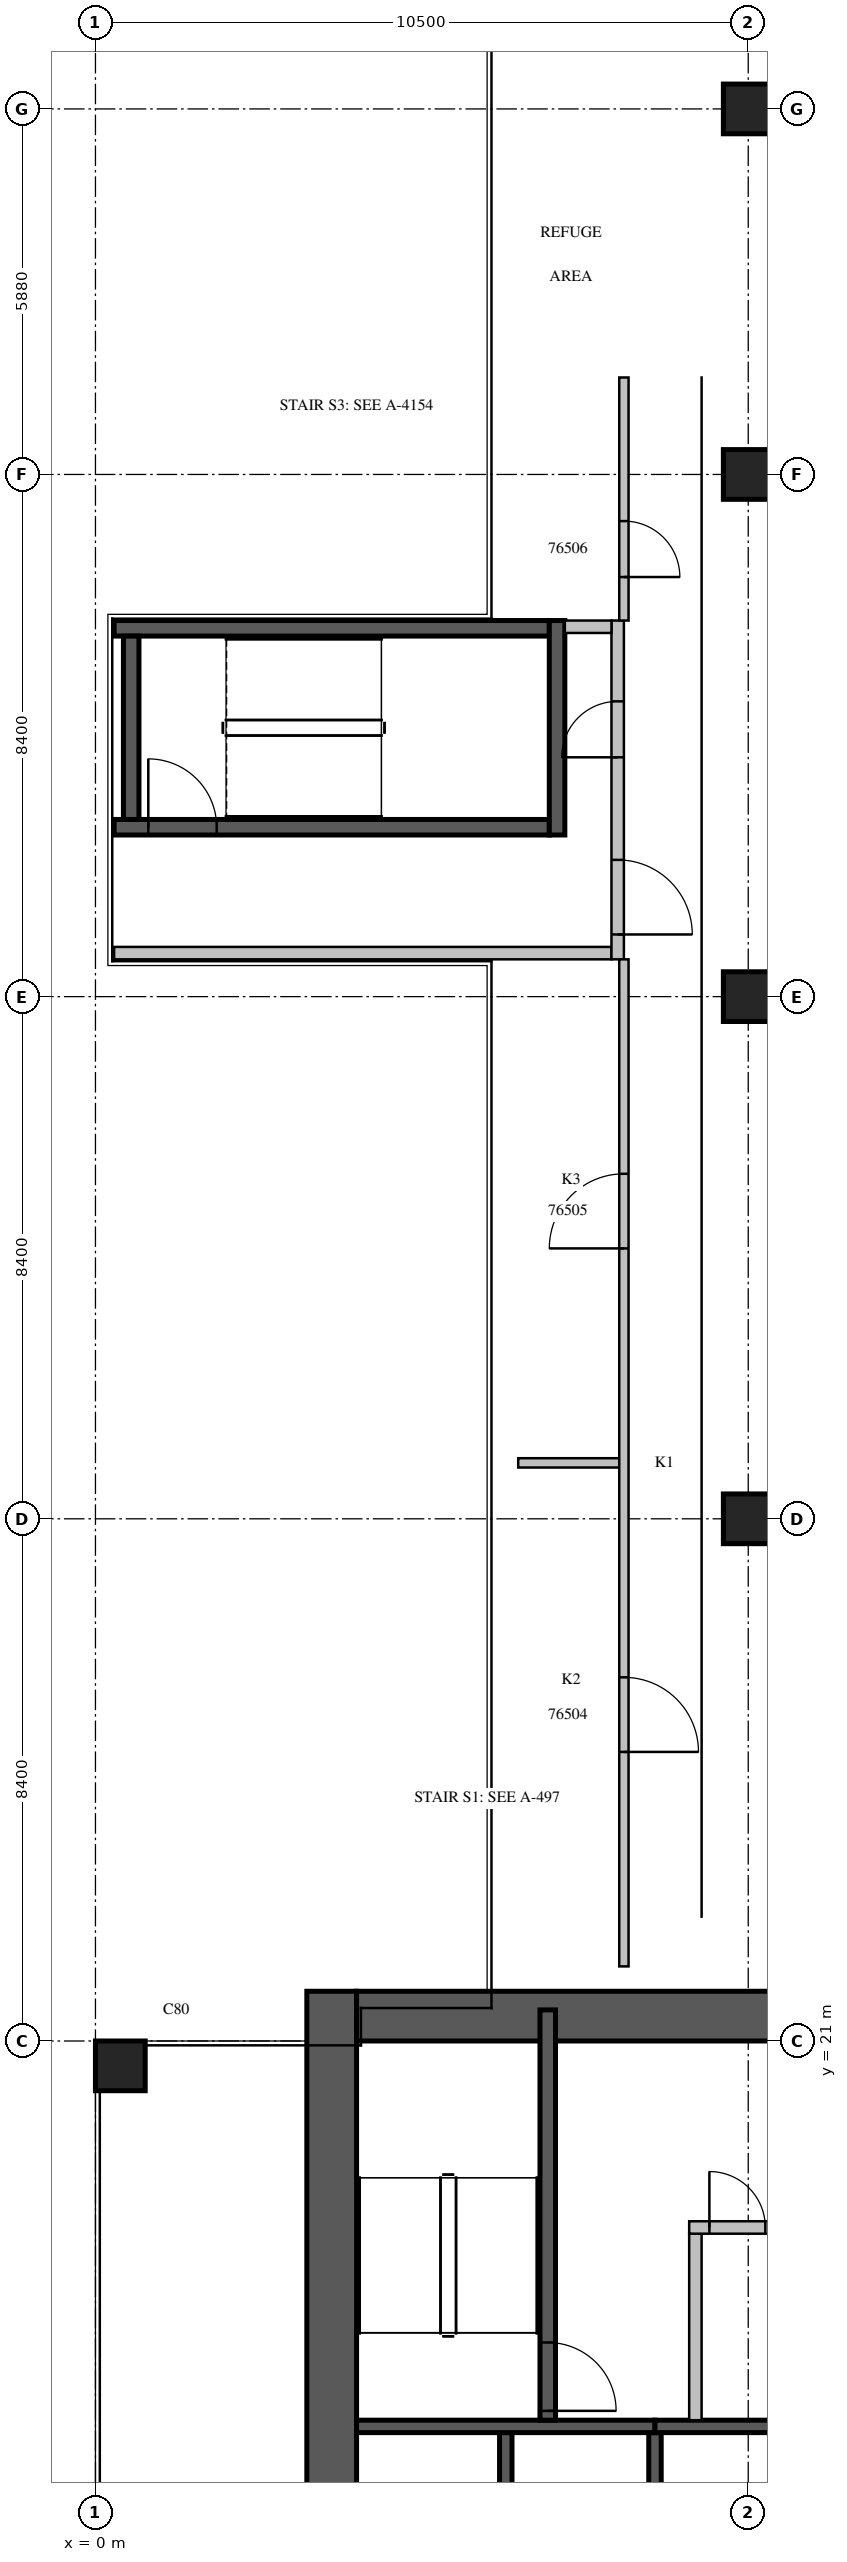
"""IFC4 building model, lengths in metres.
Left out: names, types, materials, properties, quantities, classifications, styles, units other than length and angle.
Written with IfcOpenShell. Run it as: python <this file> out.ifc"""

import sys

from ifc_helpers import new_model, si_unit, direction, frame, frame_2d, origin, origin_2d, place, context, subcontext, project, spatial, rectangle, extrude, source, transform, mapped, element, fill, save


model = new_model("IFC4")
c1 = context("Model", 3, precision=1e-05, world=origin(), true_north=direction((0.0, 1.0)))
c2 = subcontext(c1, "Body", "Model", "MODEL_VIEW")
j1 = project(units=[si_unit("LENGTHUNIT", "METRE"), si_unit("PLANEANGLEUNIT", "RADIAN")], contexts=[c1])
p1 = place(None, origin())
s1 = spatial("IfcSite", under=j1, at=p1, CompositionType="ELEMENT")
p2 = place(p1, origin())
s2 = spatial("IfcBuilding", under=s1, at=p2, CompositionType="ELEMENT")
p3 = place(p2, frame((0.0, 0.0, 269.0)))
s3 = spatial("IfcBuildingStorey", under=s2, at=p3, CompositionType="ELEMENT", Elevation=269.0)
m1 = source(origin(), c2, "Body", "SweptSolid", [
    extrude(rectangle(XDim=0.8, YDim=0.8, at=origin_2d()), origin(), (0.0, 0.0, 1.0), 8.0),
])
for number, where, z_axis, x_axis in (
    (1, (0.4, 20.6, 0.0), (0.0, 0.0, 1.0), (1.0, 0.0, 0.0)),
    (2, (10.5, 29.4, 0.0), (0.0, 0.0, 1.0), (1.0, 0.0, 0.0)),
    (3, (10.5, 37.8, 0.0), (0.0, 0.0, 1.0), (1.0, 0.0, 0.0)),
    (4, (10.5, 46.2, 0.0), (0.0, 0.0, 1.0), (1.0, 0.0, 0.0)),
    (5, (10.5, 52.08, 0.0), (0.0, 0.0, 1.0), (1.0, 0.0, 0.0)),
):
    element("IfcColumn", number, at=place(p3, frame(where, z_axis=z_axis, x_axis=x_axis)), inside=s3, PredefinedType="COLUMN", context=c2, shape_type="MappedRepresentation", body=[
        mapped(m1, transform((0.0, 0.0, 0.0), scale=1.0)),
    ])
p4 = place(p3, frame((3.8, 4.2, 0.0), z_axis=(0.0, 0.0, 1.0), x_axis=(0.0, 1.0, 0.0)))
e6 = element("IfcWall", 6, at=p4, inside=s3, PredefinedType="SHEAR", context=c2, shape_type="SweptSolid", body=[
    extrude(rectangle(XDim=17.6, YDim=0.8, at=frame_2d((8.8, 0.0))), origin(), (0.0, 0.0, 1.0), 8.0),
])
m2 = source(origin(), c2, "Body", "SweptSolid", [
    extrude(rectangle(XDim=2.2, YDim=2.1, at=frame_2d((1.1, 1.05))), frame((0.0, 0.41, 0.0), z_axis=(0.0, -1.0, 0.0), x_axis=(1.0, 0.0, 0.0)), (0.0, 0.0, 1.0), 0.82),
])
p5 = place(p4, frame((4.2, 0.0, 0.0)))
e7 = element("IfcOpeningElement", 7, at=p5, cuts=e6, PredefinedType="OPENING", context=c2, shape_type="MappedRepresentation", body=[
    mapped(m2, transform((0.0, 0.0, 0.0), scale=1.0)),
])
m3 = source(origin(), c2, "Body", "SweptSolid", [
    extrude(rectangle(XDim=16.8, YDim=0.8, at=frame_2d((8.4, 0.0))), origin(), (0.0, 0.0, 1.0), 8.0),
])
p6 = place(p3, frame((4.2, 21.4, 0.0), z_axis=(0.0, 0.0, 1.0), x_axis=(1.0, 0.0, 0.0)))
e8 = element("IfcWall", 8, at=p6, inside=s3, PredefinedType="SHEAR", context=c2, shape_type="MappedRepresentation", body=[
    mapped(m3, transform((0.0, 0.0, 0.0), scale=1.0)),
])
m4 = source(origin(), c2, "Body", "SweptSolid", [
    extrude(rectangle(XDim=1.2, YDim=2.1, at=frame_2d((0.6, 1.05))), frame((0.0, 0.41, 0.0), z_axis=(0.0, -1.0, 0.0), x_axis=(1.0, 0.0, 0.0)), (0.0, 0.0, 1.0), 0.82),
])
p7 = place(p6, frame((7.4, 0.0, 0.0)))
e9 = element("IfcOpeningElement", 9, at=p7, cuts=e8, PredefinedType="OPENING", context=c2, shape_type="MappedRepresentation", body=[
    mapped(m4, transform((0.0, 0.0, 0.0), scale=1.0)),
])
m5 = source(origin(), c2, "Body", "SweptSolid", [
    extrude(rectangle(XDim=3.0, YDim=0.2, at=frame_2d((1.5, 0.0))), origin(), (0.0, 0.0, 1.0), 8.0),
])
p8 = place(p3, frame((6.6, 11.7, 0.0), z_axis=(0.0, 0.0, 1.0), x_axis=(0.0, 1.0, 0.0)))
e10 = element("IfcWall", 10, at=p8, inside=s3, PredefinedType="SOLIDWALL", context=c2, shape_type="MappedRepresentation", body=[
    mapped(m5, transform((0.0, 0.0, 0.0), scale=1.0)),
])
m6 = source(origin(), c2, "Body", "SweptSolid", [
    extrude(rectangle(XDim=3.0, YDim=0.2, at=frame_2d((1.5, 0.0))), origin(), (0.0, 0.0, 1.0), 7.6),
])
p9 = place(p3, frame((9.0, 11.7, 0.0), z_axis=(0.0, 0.0, 1.0), x_axis=(0.0, 1.0, 0.0)))
e11 = element("IfcWall", 11, at=p9, inside=s3, PredefinedType="SOLIDWALL", context=c2, shape_type="MappedRepresentation", body=[
    mapped(m6, transform((0.0, 0.0, 0.0), scale=1.0)),
])
m7 = source(origin(), c2, "Body", "SweptSolid", [
    extrude(rectangle(XDim=4.8, YDim=0.2, at=frame_2d((2.4, 0.0))), origin(), (0.0, 0.0, 1.0), 8.0),
])
p10 = place(p3, frame((4.2, 14.8, 0.0), z_axis=(0.0, 0.0, 1.0), x_axis=(1.0, 0.0, 0.0)))
e12 = element("IfcWall", 12, at=p10, inside=s3, PredefinedType="SOLIDWALL", context=c2, shape_type="MappedRepresentation", body=[
    mapped(m7, transform((0.0, 0.0, 0.0), scale=1.0)),
])
m8 = source(origin(), c2, "Body", "SweptSolid", [
    extrude(rectangle(XDim=2.4, YDim=0.2, at=frame_2d((1.2, 0.0))), origin(), (0.0, 0.0, 1.0), 7.6),
])
p11 = place(p3, frame((9.0, 14.8, 0.0), z_axis=(0.0, 0.0, 1.0), x_axis=(1.0, 0.0, 0.0)))
e13 = element("IfcWall", 13, at=p11, inside=s3, PredefinedType="SOLIDWALL", context=c2, shape_type="MappedRepresentation", body=[
    mapped(m8, transform((0.0, 0.0, 0.0), scale=1.0)),
])
m9 = source(origin(), c2, "Body", "SweptSolid", [
    extrude(rectangle(XDim=6.6, YDim=0.25, at=frame_2d((3.3, 0.0))), origin(), (0.0, 0.0, 1.0), 7.6),
])
p12 = place(p3, frame((7.275, 14.9, 0.0), z_axis=(0.0, 0.0, 1.0), x_axis=(0.0, 1.0, 0.0)))
e14 = element("IfcWall", 14, at=p12, inside=s3, PredefinedType="SOLIDWALL", context=c2, shape_type="MappedRepresentation", body=[
    mapped(m9, transform((0.0, 0.0, 0.0), scale=1.0)),
])
m10 = source(origin(), c2, "Body", "SweptSolid", [
    extrude(rectangle(XDim=1.1, YDim=2.1, at=frame_2d((0.55, 1.05))), frame((0.0, 0.135, 0.0), z_axis=(0.0, -1.0, 0.0), x_axis=(1.0, 0.0, 0.0)), (0.0, 0.0, 1.0), 0.27),
])
p13 = place(p12, frame((0.15, 0.0, 0.0)))
e15 = element("IfcOpeningElement", 15, at=p13, cuts=e14, PredefinedType="OPENING", context=c2, shape_type="MappedRepresentation", body=[
    mapped(m10, transform((0.0, 0.0, 0.0), scale=1.0)),
])
m11 = source(origin(), c2, "Body", "SweptSolid", [
    extrude(rectangle(XDim=3.0, YDim=0.2, at=frame_2d((1.5, 0.0))), origin(), (0.0, 0.0, 1.0), 7.6),
])
p14 = place(p3, frame((9.65, 14.9, 0.0), z_axis=(0.0, 0.0, 1.0), x_axis=(0.0, 1.0, 0.0)))
e16 = element("IfcWall", 16, at=p14, inside=s3, PredefinedType="PARTITIONING", context=c2, shape_type="MappedRepresentation", body=[
    mapped(m11, transform((0.0, 0.0, 0.0), scale=1.0)),
])
m12 = source(origin(), c2, "Body", "SweptSolid", [
    extrude(rectangle(XDim=11.45, YDim=0.2, at=frame_2d((5.725, 0.0))), origin(), (0.0, 0.0, 1.0), 7.6),
])
p15 = place(p3, frame((9.55, 18.0, 0.0), z_axis=(0.0, 0.0, 1.0), x_axis=(1.0, 0.0, 0.0)))
e17 = element("IfcWall", 17, at=p15, inside=s3, PredefinedType="PARTITIONING", context=c2, shape_type="MappedRepresentation", body=[
    mapped(m12, transform((0.0, 0.0, 0.0), scale=1.0)),
])
m13 = source(origin(), c2, "Body", "SweptSolid", [
    extrude(rectangle(XDim=0.9, YDim=2.1, at=frame_2d((0.45, 1.05))), frame((0.0, 0.11, 0.0), z_axis=(0.0, -1.0, 0.0), x_axis=(1.0, 0.0, 0.0)), (0.0, 0.0, 1.0), 0.22),
])
p16 = place(p15, frame((0.325, 0.0, 0.0)))
e18 = element("IfcOpeningElement", 18, at=p16, cuts=e17, PredefinedType="OPENING", context=c2, shape_type="MappedRepresentation", body=[
    mapped(m13, transform((0.0, 0.0, 0.0), scale=1.0)),
])
m14 = source(origin(), c2, "Body", "SweptSolid", [
    extrude(rectangle(XDim=1.1, YDim=2.1, at=frame_2d((0.55, 1.05))), frame((0.0, 0.11, 0.0), z_axis=(0.0, -1.0, 0.0), x_axis=(1.0, 0.0, 0.0)), (0.0, 0.0, 1.0), 0.22),
])
p17 = place(p15, frame((2.275, 0.0, 0.0)))
e19 = element("IfcOpeningElement", 19, at=p17, cuts=e17, PredefinedType="OPENING", context=c2, shape_type="MappedRepresentation", body=[
    mapped(m14, transform((0.0, 0.0, 0.0), scale=1.0)),
])
p18 = place(p15, frame((7.35, 0.0, 0.0)))
e20 = element("IfcOpeningElement", 20, at=p18, cuts=e17, PredefinedType="OPENING", context=c2, shape_type="MappedRepresentation", body=[
    mapped(m14, transform((0.0, 0.0, 0.0), scale=1.0)),
])
m15 = source(origin(), c2, "Body", "SweptSolid", [
    extrude(rectangle(XDim=7.0, YDim=0.25, at=frame_2d((3.5, 0.0))), origin(), (0.0, 0.0, 1.0), 7.6),
])
p19 = place(p3, frame((0.3, 40.525, 0.0), z_axis=(0.0, 0.0, 1.0), x_axis=(1.0, 0.0, 0.0)))
e21 = element("IfcWall", 21, at=p19, inside=s3, PredefinedType="SOLIDWALL", context=c2, shape_type="MappedRepresentation", body=[
    mapped(m15, transform((0.0, 0.0, 0.0), scale=1.0)),
])
p20 = place(p19, frame((0.55, 0.0, 0.0)))
e22 = element("IfcOpeningElement", 22, at=p20, cuts=e21, PredefinedType="OPENING", context=c2, shape_type="MappedRepresentation", body=[
    mapped(m10, transform((0.0, 0.0, 0.0), scale=1.0)),
])
p21 = place(p3, frame((0.3, 43.725, 0.0), z_axis=(0.0, 0.0, 1.0), x_axis=(1.0, 0.0, 0.0)))
e23 = element("IfcWall", 23, at=p21, inside=s3, PredefinedType="SOLIDWALL", context=c2, shape_type="MappedRepresentation", body=[
    mapped(m15, transform((0.0, 0.0, 0.0), scale=1.0)),
])
m16 = source(origin(), c2, "Body", "SweptSolid", [
    extrude(rectangle(XDim=3.45, YDim=0.25, at=frame_2d((1.725, 0.0))), origin(), (0.0, 0.0, 1.0), 7.6),
])
p22 = place(p3, frame((7.425, 40.4, 0.0), z_axis=(0.0, 0.0, 1.0), x_axis=(0.0, 1.0, 0.0)))
e24 = element("IfcWall", 24, at=p22, inside=s3, PredefinedType="SOLIDWALL", context=c2, shape_type="MappedRepresentation", body=[
    mapped(m16, transform((0.0, 0.0, 0.0), scale=1.0)),
])
m17 = source(origin(), c2, "Body", "SweptSolid", [
    extrude(rectangle(XDim=2.95, YDim=0.25, at=frame_2d((1.475, 0.0))), origin(), (0.0, 0.0, 1.0), 7.6),
])
p23 = place(p3, frame((0.575, 40.65, 0.0), z_axis=(0.0, 0.0, 1.0), x_axis=(0.0, 1.0, 0.0)))
e25 = element("IfcWall", 25, at=p23, inside=s3, PredefinedType="SOLIDWALL", context=c2, shape_type="MappedRepresentation", body=[
    mapped(m17, transform((0.0, 0.0, 0.0), scale=1.0)),
])
m18 = source(origin(), c2, "Body", "SweptSolid", [
    extrude(rectangle(XDim=8.0, YDim=0.2, at=frame_2d((4.0, 0.0))), origin(), (0.0, 0.0, 1.0), 7.6),
])
p24 = place(p3, frame((0.3, 38.5, 0.0), z_axis=(0.0, 0.0, 1.0), x_axis=(1.0, 0.0, 0.0)))
e26 = element("IfcWall", 26, at=p24, inside=s3, PredefinedType="PARTITIONING", context=c2, shape_type="MappedRepresentation", body=[
    mapped(m18, transform((0.0, 0.0, 0.0), scale=1.0)),
])
m19 = source(origin(), c2, "Body", "SweptSolid", [
    extrude(rectangle(XDim=5.45, YDim=0.2, at=frame_2d((2.725, 0.0))), origin(), (0.0, 0.0, 1.0), 7.6),
])
p25 = place(p3, frame((8.4, 38.4, 0.0), z_axis=(0.0, 0.0, 1.0), x_axis=(0.0, 1.0, 0.0)))
e27 = element("IfcWall", 27, at=p25, inside=s3, PredefinedType="PARTITIONING", context=c2, shape_type="MappedRepresentation", body=[
    mapped(m19, transform((0.0, 0.0, 0.0), scale=1.0)),
])
m20 = source(origin(), c2, "Body", "SweptSolid", [
    extrude(rectangle(XDim=1.2, YDim=2.1, at=frame_2d((0.6, 1.05))), frame((0.0, 0.11, 0.0), z_axis=(0.0, -1.0, 0.0), x_axis=(1.0, 0.0, 0.0)), (0.0, 0.0, 1.0), 0.22),
])
p26 = place(p25, frame((0.4, 0.0, 0.0)))
e28 = element("IfcOpeningElement", 28, at=p26, cuts=e27, PredefinedType="OPENING", context=c2, shape_type="MappedRepresentation", body=[
    mapped(m20, transform((0.0, 0.0, 0.0), scale=1.0)),
])
p27 = place(p25, frame((3.25, 0.0, 0.0)))
e29 = element("IfcOpeningElement", 29, at=p27, cuts=e27, PredefinedType="OPENING", context=c2, shape_type="MappedRepresentation", body=[
    mapped(m13, transform((0.0, 0.0, 0.0), scale=1.0)),
])
m21 = source(origin(), c2, "Body", "SweptSolid", [
    extrude(rectangle(XDim=0.75, YDim=0.2, at=frame_2d((0.375, 0.0))), origin(), (0.0, 0.0, 1.0), 7.6),
])
p28 = place(p3, frame((7.55, 43.75, 0.0), z_axis=(0.0, 0.0, 1.0), x_axis=(1.0, 0.0, 0.0)))
e30 = element("IfcWall", 30, at=p28, inside=s3, PredefinedType="PARTITIONING", context=c2, shape_type="MappedRepresentation", body=[
    mapped(m21, transform((0.0, 0.0, 0.0), scale=1.0)),
])
m22 = source(origin(), c2, "Body", "SweptSolid", [
    extrude(rectangle(XDim=1.7, YDim=0.15, at=frame_2d((0.85, 0.0))), origin(), (0.0, 0.0, 1.0), 7.6),
])
p29 = place(p3, frame((6.8, 30.3, 0.0), z_axis=(0.0, 0.0, 1.0), x_axis=(1.0, 0.0, 0.0)))
e31 = element("IfcWall", 31, at=p29, inside=s3, PredefinedType="PARTITIONING", context=c2, shape_type="MappedRepresentation", body=[
    mapped(m22, transform((0.0, 0.0, 0.0), scale=1.0)),
])
m23 = source(origin(), c2, "Body", "SweptSolid", [
    extrude(rectangle(XDim=16.2, YDim=0.15, at=frame_2d((8.1, 0.0))), origin(), (0.0, 0.0, 1.0), 7.6),
])
p30 = place(p3, frame((8.5, 22.2, 0.0), z_axis=(0.0, 0.0, 1.0), x_axis=(0.0, 1.0, 0.0)))
e32 = element("IfcWall", 32, at=p30, inside=s3, PredefinedType="PARTITIONING", context=c2, shape_type="MappedRepresentation", body=[
    mapped(m23, transform((0.0, 0.0, 0.0), scale=1.0)),
])
m24 = source(origin(), c2, "Body", "SweptSolid", [
    extrude(rectangle(XDim=1.2, YDim=2.1, at=frame_2d((0.6, 1.05))), frame((0.0, 0.085, 0.0), z_axis=(0.0, -1.0, 0.0), x_axis=(1.0, 0.0, 0.0)), (0.0, 0.0, 1.0), 0.17),
])
p31 = place(p30, frame((3.45, 0.0, 0.0)))
e33 = element("IfcOpeningElement", 33, at=p31, cuts=e32, PredefinedType="OPENING", context=c2, shape_type="MappedRepresentation", body=[
    mapped(m24, transform((0.0, 0.0, 0.0), scale=1.0)),
])
p32 = place(p30, frame((11.55, 0.0, 0.0)))
e34 = element("IfcOpeningElement", 34, at=p32, cuts=e32, PredefinedType="OPENING", context=c2, shape_type="MappedRepresentation", body=[
    mapped(m24, transform((0.0, 0.0, 0.0), scale=1.0)),
])
m25 = source(origin(), c2, "Body", "SweptSolid", [
    extrude(rectangle(XDim=3.91, YDim=0.15, at=frame_2d((1.955, 0.0))), origin(), (0.0, 0.0, 1.0), 7.6),
])
p33 = place(p3, frame((8.5, 43.85, 0.0), z_axis=(0.0, 0.0, 1.0), x_axis=(0.0, 1.0, 0.0)))
e35 = element("IfcWall", 35, at=p33, inside=s3, PredefinedType="PARTITIONING", context=c2, shape_type="MappedRepresentation", body=[
    mapped(m25, transform((0.0, 0.0, 0.0), scale=1.0)),
])
m26 = source(origin(), c2, "Body", "SweptSolid", [
    extrude(rectangle(XDim=0.9, YDim=2.1, at=frame_2d((0.45, 1.05))), frame((0.0, 0.085, 0.0), z_axis=(0.0, -1.0, 0.0), x_axis=(1.0, 0.0, 0.0)), (0.0, 0.0, 1.0), 0.17),
])
p34 = place(p33, frame((0.7, 0.0, 0.0)))
e36 = element("IfcOpeningElement", 36, at=p34, cuts=e35, PredefinedType="OPENING", context=c2, shape_type="MappedRepresentation", body=[
    mapped(m26, transform((0.0, 0.0, 0.0), scale=1.0)),
])
m27 = source(origin(), c2, "Body", "SweptSolid", [
    extrude(rectangle(XDim=1.1, YDim=2.1, at=frame_2d((0.55, 1.05))), frame((0.0, 0.025, 0.0), z_axis=(0.0, -1.0, 0.0), x_axis=(1.0, 0.0, 0.0)), (0.0, 0.0, 1.0), 0.05),
])
p35 = place(p13, origin())
e37 = element("IfcDoor", 37, at=p35, inside=s3, OperationType="SINGLE_SWING_RIGHT", PredefinedType="DOOR", context=c2, shape_type="MappedRepresentation", body=[
    mapped(m27, transform((0.0, 0.0, 0.0), scale=1.0)),
])
fill(e15, e37)
m28 = source(origin(), c2, "Body", "SweptSolid", [
    extrude(rectangle(XDim=0.9, YDim=2.1, at=frame_2d((0.45, 1.05))), frame((0.0, 0.025, 0.0), z_axis=(0.0, -1.0, 0.0), x_axis=(1.0, 0.0, 0.0)), (0.0, 0.0, 1.0), 0.05),
])
p36 = place(p16, origin())
e38 = element("IfcDoor", 38, at=p36, inside=s3, OperationType="SINGLE_SWING_LEFT", PredefinedType="DOOR", context=c2, shape_type="MappedRepresentation", body=[
    mapped(m28, transform((0.0, 0.0, 0.0), scale=1.0)),
])
fill(e18, e38)
p37 = place(p20, origin())
e39 = element("IfcDoor", 39, at=p37, inside=s3, OperationType="SINGLE_SWING_LEFT", PredefinedType="DOOR", context=c2, shape_type="MappedRepresentation", body=[
    mapped(m27, transform((0.0, 0.0, 0.0), scale=1.0)),
])
fill(e22, e39)
m29 = source(origin(), c2, "Body", "SweptSolid", [
    extrude(rectangle(XDim=1.2, YDim=2.1, at=frame_2d((0.6, 1.05))), frame((0.0, 0.025, 0.0), z_axis=(0.0, -1.0, 0.0), x_axis=(1.0, 0.0, 0.0)), (0.0, 0.0, 1.0), 0.05),
])
p38 = place(p26, origin())
e40 = element("IfcDoor", 40, at=p38, inside=s3, OperationType="SINGLE_SWING_RIGHT", PredefinedType="DOOR", context=c2, shape_type="MappedRepresentation", body=[
    mapped(m29, transform((0.0, 0.0, 0.0), scale=1.0)),
])
fill(e28, e40)
p39 = place(p27, origin())
e41 = element("IfcDoor", 41, at=p39, inside=s3, OperationType="SINGLE_SWING_LEFT", PredefinedType="DOOR", context=c2, shape_type="MappedRepresentation", body=[
    mapped(m28, transform((0.0, 0.0, 0.0), scale=1.0)),
])
fill(e29, e41)
p40 = place(p31, origin())
e42 = element("IfcDoor", 42, at=p40, inside=s3, OperationType="SINGLE_SWING_RIGHT", PredefinedType="DOOR", context=c2, shape_type="MappedRepresentation", body=[
    mapped(m29, transform((0.0, 0.0, 0.0), scale=1.0)),
])
fill(e33, e42)
p41 = place(p32, origin())
e43 = element("IfcDoor", 43, at=p41, inside=s3, OperationType="SINGLE_SWING_LEFT", PredefinedType="DOOR", context=c2, shape_type="MappedRepresentation", body=[
    mapped(m29, transform((0.0, 0.0, 0.0), scale=1.0)),
])
fill(e34, e43)
p42 = place(p34, origin())
e44 = element("IfcDoor", 44, at=p42, inside=s3, OperationType="SINGLE_SWING_RIGHT", PredefinedType="DOOR", context=c2, shape_type="MappedRepresentation", body=[
    mapped(m28, transform((0.0, 0.0, 0.0), scale=1.0)),
])
fill(e36, e44)
save(model, sys.argv[1])
